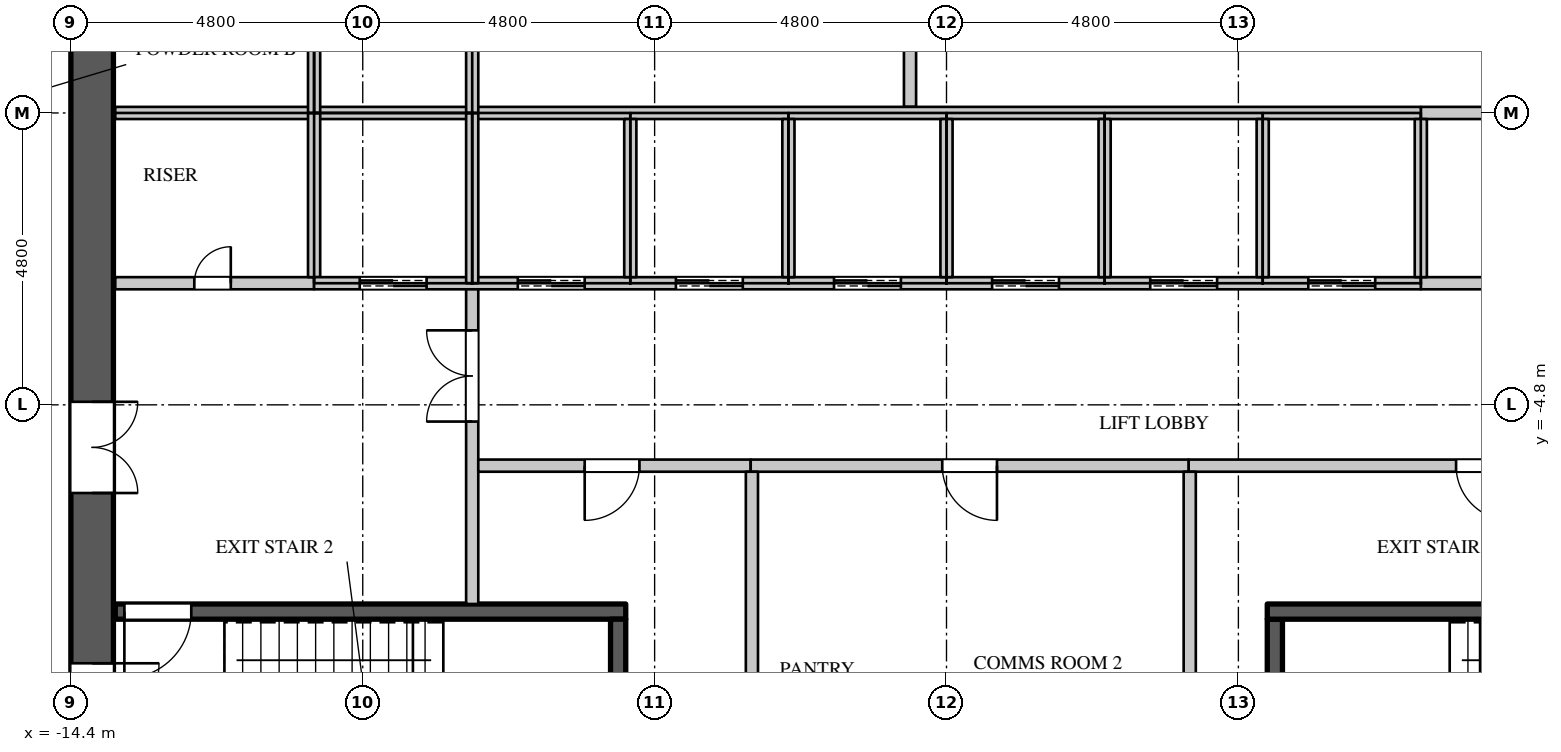
"""IFC4 building model, lengths in metres.
Left out: names, types, materials, properties, quantities, classifications, styles, units other than length and angle.
Written with IfcOpenShell. Run it as: python <this file> out.ifc"""

import sys

from ifc_helpers import new_model, si_unit, direction, frame, frame_2d, origin, place, context, subcontext, project, spatial, rectangle, extrude, element, fill, save


model = new_model("IFC4")
c1 = context("Model", 3, precision=1e-05, world=origin(), true_north=direction((0.0, 1.0)))
c2 = subcontext(c1, "Body", "Model", "MODEL_VIEW")
j1 = project(units=[si_unit("LENGTHUNIT", "METRE"), si_unit("PLANEANGLEUNIT", "RADIAN")], contexts=[c1])
p1 = place(None, origin())
s1 = spatial("IfcSite", under=j1, at=p1, CompositionType="ELEMENT")
p2 = place(p1, origin())
s2 = spatial("IfcBuilding", under=s1, at=p2, CompositionType="ELEMENT")
p3 = place(p2, frame((0.0, 0.0, 200.1)))
s3 = spatial("IfcBuildingStorey", under=s2, at=p3, CompositionType="ELEMENT", Elevation=200.1)
p4 = place(p3, frame((-14.05, -11.3, 0.0), z_axis=(0.0, 0.0, 1.0), x_axis=(0.0, 1.0, 0.0)))
e1 = element("IfcWall", 1, at=p4, inside=s3, PredefinedType="SHEAR", context=c2, shape_type="SweptSolid", body=[
    extrude(rectangle(XDim=22.6, YDim=0.7, at=frame_2d((11.3, 0.0))), origin(), (0.0, 0.0, 1.0), 4.2),
])
p5 = place(p4, frame((20.35, 0.0, 0.0)))
e2 = element("IfcOpeningElement", 2, at=p5, cuts=e1, PredefinedType="OPENING", context=c2, shape_type="SweptSolid", body=[
    extrude(rectangle(XDim=1.1, YDim=2.2, at=frame_2d((0.55, 1.1))), frame((0.0, 0.36, 0.0), z_axis=(0.0, -1.0, 0.0), x_axis=(1.0, 0.0, 0.0)), (0.0, 0.0, 1.0), 0.72),
])
p6 = place(p4, frame((1.15, 0.0, 0.0)))
e3 = element("IfcOpeningElement", 3, at=p6, cuts=e1, PredefinedType="OPENING", context=c2, shape_type="SweptSolid", body=[
    extrude(rectangle(XDim=1.1, YDim=2.2, at=frame_2d((0.55, 1.1))), frame((0.0, 0.36, 0.0), z_axis=(0.0, -1.0, 0.0), x_axis=(1.0, 0.0, 0.0)), (0.0, 0.0, 1.0), 0.72),
])
p7 = place(p4, frame((16.05, 0.0, 0.0)))
e4 = element("IfcOpeningElement", 4, at=p7, cuts=e1, PredefinedType="OPENING", context=c2, shape_type="SweptSolid", body=[
    extrude(rectangle(XDim=1.5, YDim=2.4, at=frame_2d((0.75, 1.2))), frame((0.0, 0.36, 0.0), z_axis=(0.0, -1.0, 0.0), x_axis=(1.0, 0.0, 0.0)), (0.0, 0.0, 1.0), 0.72),
])
p8 = place(p4, frame((5.05, 0.0, 0.0)))
e5 = element("IfcOpeningElement", 5, at=p8, cuts=e1, PredefinedType="OPENING", context=c2, shape_type="SweptSolid", body=[
    extrude(rectangle(XDim=1.5, YDim=2.4, at=frame_2d((0.75, 1.2))), frame((0.0, 0.36, 0.0), z_axis=(0.0, -1.0, 0.0), x_axis=(1.0, 0.0, 0.0)), (0.0, 0.0, 1.0), 0.72),
])
p9 = place(p3, frame((-7.8, -8.075, 0.0), z_axis=(0.0, 0.0, 1.0), x_axis=(0.0, 1.0, 0.0)))
e6 = element("IfcWall", 6, at=p9, inside=s3, PredefinedType="PARTITIONING", context=c2, shape_type="SweptSolid", body=[
    extrude(rectangle(XDim=5.275, YDim=0.2, at=frame_2d((2.637, 0.0))), origin(), (0.0, 0.0, 1.0), 3.798),
])
p10 = place(p9, frame((3.0, 0.0, 0.0)))
e7 = element("IfcOpeningElement", 7, at=p10, cuts=e6, PredefinedType="OPENING", context=c2, shape_type="SweptSolid", body=[
    extrude(rectangle(XDim=1.5, YDim=2.4, at=frame_2d((0.75, 1.2))), frame((0.0, 0.11, 0.0), z_axis=(0.0, -1.0, 0.0), x_axis=(1.0, 0.0, 0.0)), (0.0, 0.0, 1.0), 0.22),
])
p11 = place(p3, frame((-7.7, -5.8, 0.0), z_axis=(0.0, 0.0, 1.0), x_axis=(1.0, 0.0, 0.0)))
e8 = element("IfcWall", 8, at=p11, inside=s3, PredefinedType="PARTITIONING", context=c2, shape_type="SweptSolid", body=[
    extrude(rectangle(XDim=4.48, YDim=0.2, at=frame_2d((2.24, 0.0))), origin(), (0.0, 0.0, 1.0), 3.798),
])
p12 = place(p11, frame((1.75, 0.0, 0.0)))
e9 = element("IfcOpeningElement", 9, at=p12, cuts=e8, PredefinedType="OPENING", context=c2, shape_type="SweptSolid", body=[
    extrude(rectangle(XDim=0.9, YDim=2.2, at=frame_2d((0.45, 1.1))), frame((0.0, 0.11, 0.0), z_axis=(0.0, -1.0, 0.0), x_axis=(1.0, 0.0, 0.0)), (0.0, 0.0, 1.0), 0.22),
])
p13 = place(p3, frame((3.98, -5.8, 0.0), z_axis=(0.0, 0.0, 1.0), x_axis=(1.0, 0.0, 0.0)))
e10 = element("IfcWall", 10, at=p13, inside=s3, PredefinedType="PARTITIONING", context=c2, shape_type="SweptSolid", body=[
    extrude(rectangle(XDim=9.69, YDim=0.2, at=frame_2d((4.845, 0.0))), origin(), (0.0, 0.0, 1.0), 3.798),
])
p14 = place(p13, frame((4.4, 0.0, 0.0)))
e11 = element("IfcOpeningElement", 11, at=p14, cuts=e10, PredefinedType="OPENING", context=c2, shape_type="SweptSolid", body=[
    extrude(rectangle(XDim=0.9, YDim=2.2, at=frame_2d((0.45, 1.1))), frame((0.0, 0.11, 0.0), z_axis=(0.0, -1.0, 0.0), x_axis=(1.0, 0.0, 0.0)), (0.0, 0.0, 1.0), 0.22),
])
p15 = place(p3, frame((-13.67, -2.8, 0.0), z_axis=(0.0, 0.0, 1.0), x_axis=(1.0, 0.0, 0.0)))
e12 = element("IfcWall", 12, at=p15, inside=s3, PredefinedType="PARTITIONING", context=c2, shape_type="SweptSolid", body=[
    extrude(rectangle(XDim=3.27, YDim=0.2, at=frame_2d((1.635, 0.0))), origin(), (0.0, 0.0, 1.0), 3.798),
])
p16 = place(p15, frame((1.3, 0.0, 0.0)))
e13 = element("IfcOpeningElement", 13, at=p16, cuts=e12, PredefinedType="OPENING", context=c2, shape_type="SweptSolid", body=[
    extrude(rectangle(XDim=0.6, YDim=2.0, at=frame_2d((0.3, 1.0))), frame((0.0, 0.11, 0.0), z_axis=(0.0, -1.0, 0.0), x_axis=(1.0, 0.0, 0.0)), (0.0, 0.0, 1.0), 0.22),
])
p17 = place(p3, frame((-3.22, -5.8, 0.0), z_axis=(0.0, 0.0, 1.0), x_axis=(1.0, 0.0, 0.0)))
e14 = element("IfcWall", 14, at=p17, inside=s3, PredefinedType="PARTITIONING", context=c2, shape_type="SweptSolid", body=[
    extrude(rectangle(XDim=7.2, YDim=0.2, at=frame_2d((3.6, 0.0))), origin(), (0.0, 0.0, 1.0), 3.798),
])
p18 = place(p17, frame((3.15, 0.0, 0.0)))
e15 = element("IfcOpeningElement", 15, at=p18, cuts=e14, PredefinedType="OPENING", context=c2, shape_type="SweptSolid", body=[
    extrude(rectangle(XDim=0.9, YDim=2.2, at=frame_2d((0.45, 1.1))), frame((0.0, 0.11, 0.0), z_axis=(0.0, -1.0, 0.0), x_axis=(1.0, 0.0, 0.0)), (0.0, 0.0, 1.0), 0.22),
])
p19 = place(p3, frame((-3.2, -11.27, 0.0), z_axis=(0.0, 0.0, 1.0), x_axis=(0.0, 1.0, 0.0)))
e16 = element("IfcWall", 16, at=p19, inside=s3, PredefinedType="PARTITIONING", context=c2, shape_type="SweptSolid", body=[
    extrude(rectangle(XDim=5.37, YDim=0.2, at=frame_2d((2.685, 0.0))), origin(), (0.0, 0.0, 1.0), 3.798),
])
p20 = place(p3, frame((-0.6, 0.1, 0.0), z_axis=(0.0, 0.0, 1.0), x_axis=(0.0, 1.0, 0.0)))
e17 = element("IfcWall", 17, at=p20, inside=s3, PredefinedType="PARTITIONING", context=c2, shape_type="SweptSolid", body=[
    extrude(rectangle(XDim=2.6, YDim=0.2, at=frame_2d((1.3, 0.0))), origin(), (0.0, 0.0, 1.0), 3.798),
])
p21 = place(p3, frame((4.0, -11.27, 0.0), z_axis=(0.0, 0.0, 1.0), x_axis=(0.0, 1.0, 0.0)))
e18 = element("IfcWall", 18, at=p21, inside=s3, PredefinedType="PARTITIONING", context=c2, shape_type="SweptSolid", body=[
    extrude(rectangle(XDim=5.37, YDim=0.2, at=frame_2d((2.685, 0.0))), origin(), (0.0, 0.0, 1.0), 3.798),
])
p22 = place(p3, frame((7.8, -2.8, 0.0), z_axis=(0.0, 0.0, 1.0), x_axis=(1.0, 0.0, 0.0)))
e19 = element("IfcWall", 19, at=p22, inside=s3, PredefinedType="PARTITIONING", context=c2, shape_type="SweptSolid", body=[
    extrude(rectangle(XDim=5.87, YDim=0.2, at=frame_2d((2.935, 0.0))), origin(), (0.0, 0.0, 1.0), 3.798),
])
p23 = place(p22, frame((2.5, 0.0, 0.0)))
e20 = element("IfcOpeningElement", 20, at=p23, cuts=e19, PredefinedType="OPENING", context=c2, shape_type="SweptSolid", body=[
    extrude(rectangle(XDim=0.9, YDim=2.2, at=frame_2d((0.45, 1.1))), frame((0.0, 0.11, 0.0), z_axis=(0.0, -1.0, 0.0), x_axis=(1.0, 0.0, 0.0)), (0.0, 0.0, 1.0), 0.22),
])
p24 = place(p3, frame((7.8, 0.0, 0.0), z_axis=(0.0, 0.0, 1.0), x_axis=(1.0, 0.0, 0.0)))
e21 = element("IfcWall", 21, at=p24, inside=s3, PredefinedType="PARTITIONING", context=c2, shape_type="SweptSolid", body=[
    extrude(rectangle(XDim=5.87, YDim=0.2, at=frame_2d((2.935, 0.0))), origin(), (0.0, 0.0, 1.0), 3.798),
])
p25 = place(p3, frame((-13.67, 0.0, 0.0), z_axis=(0.0, 0.0, 1.0), x_axis=(1.0, 0.0, 0.0)))
e22 = element("IfcWall", 22, at=p25, inside=s3, PredefinedType="PARTITIONING", context=c2, shape_type="SweptSolid", body=[
    extrude(rectangle(XDim=21.47, YDim=0.2, at=frame_2d((10.735, 0.0))), origin(), (0.0, 0.0, 1.0), 3.798),
])
p26 = place(p3, frame((-10.4, -2.7, 0.0), z_axis=(0.0, 0.0, 1.0), x_axis=(0.0, 1.0, 0.0)))
e23 = element("IfcWall", 23, at=p26, inside=s3, PredefinedType="PARTITIONING", context=c2, shape_type="SweptSolid", body=[
    extrude(rectangle(XDim=2.7, YDim=0.2, at=frame_2d((1.35, 0.0))), origin(), (0.0, 0.0, 1.0), 3.798),
])
p27 = place(p3, frame((-10.4, -2.8, 0.0), z_axis=(0.0, 0.0, 1.0), x_axis=(1.0, 0.0, 0.0)))
e24 = element("IfcWall", 24, at=p27, inside=s3, PredefinedType="PARTITIONING", context=c2, shape_type="SweptSolid", body=[
    extrude(rectangle(XDim=18.2, YDim=0.2, at=frame_2d((9.1, 0.0))), origin(), (0.0, 0.0, 1.0), 3.798),
])
p28 = place(p27, frame((0.75, 0.0, 0.0)))
e25 = element("IfcOpeningElement", 25, at=p28, cuts=e24, PredefinedType="OPENING", context=c2, shape_type="SweptSolid", body=[
    extrude(rectangle(XDim=1.1, YDim=2.2, at=frame_2d((0.55, 1.1))), frame((0.0, 0.11, 0.0), z_axis=(0.0, -1.0, 0.0), x_axis=(1.0, 0.0, 0.0)), (0.0, 0.0, 1.0), 0.22),
])
p29 = place(p27, frame((3.35, 0.0, 0.0)))
e26 = element("IfcOpeningElement", 26, at=p29, cuts=e24, PredefinedType="OPENING", context=c2, shape_type="SweptSolid", body=[
    extrude(rectangle(XDim=1.1, YDim=2.2, at=frame_2d((0.55, 1.1))), frame((0.0, 0.11, 0.0), z_axis=(0.0, -1.0, 0.0), x_axis=(1.0, 0.0, 0.0)), (0.0, 0.0, 1.0), 0.22),
])
p30 = place(p27, frame((5.95, 0.0, 0.0)))
e27 = element("IfcOpeningElement", 27, at=p30, cuts=e24, PredefinedType="OPENING", context=c2, shape_type="SweptSolid", body=[
    extrude(rectangle(XDim=1.1, YDim=2.2, at=frame_2d((0.55, 1.1))), frame((0.0, 0.11, 0.0), z_axis=(0.0, -1.0, 0.0), x_axis=(1.0, 0.0, 0.0)), (0.0, 0.0, 1.0), 0.22),
])
p31 = place(p27, frame((8.55, 0.0, 0.0)))
e28 = element("IfcOpeningElement", 28, at=p31, cuts=e24, PredefinedType="OPENING", context=c2, shape_type="SweptSolid", body=[
    extrude(rectangle(XDim=1.1, YDim=2.2, at=frame_2d((0.55, 1.1))), frame((0.0, 0.11, 0.0), z_axis=(0.0, -1.0, 0.0), x_axis=(1.0, 0.0, 0.0)), (0.0, 0.0, 1.0), 0.22),
])
p32 = place(p27, frame((11.15, 0.0, 0.0)))
e29 = element("IfcOpeningElement", 29, at=p32, cuts=e24, PredefinedType="OPENING", context=c2, shape_type="SweptSolid", body=[
    extrude(rectangle(XDim=1.1, YDim=2.2, at=frame_2d((0.55, 1.1))), frame((0.0, 0.11, 0.0), z_axis=(0.0, -1.0, 0.0), x_axis=(1.0, 0.0, 0.0)), (0.0, 0.0, 1.0), 0.22),
])
p33 = place(p27, frame((13.75, 0.0, 0.0)))
e30 = element("IfcOpeningElement", 30, at=p33, cuts=e24, PredefinedType="OPENING", context=c2, shape_type="SweptSolid", body=[
    extrude(rectangle(XDim=1.1, YDim=2.2, at=frame_2d((0.55, 1.1))), frame((0.0, 0.11, 0.0), z_axis=(0.0, -1.0, 0.0), x_axis=(1.0, 0.0, 0.0)), (0.0, 0.0, 1.0), 0.22),
])
p34 = place(p27, frame((16.35, 0.0, 0.0)))
e31 = element("IfcOpeningElement", 31, at=p34, cuts=e24, PredefinedType="OPENING", context=c2, shape_type="SweptSolid", body=[
    extrude(rectangle(XDim=1.1, YDim=2.2, at=frame_2d((0.55, 1.1))), frame((0.0, 0.11, 0.0), z_axis=(0.0, -1.0, 0.0), x_axis=(1.0, 0.0, 0.0)), (0.0, 0.0, 1.0), 0.22),
])
p35 = place(p3, frame((-10.4, 0.0, 0.0), z_axis=(0.0, 0.0, 1.0), x_axis=(0.0, 1.0, 0.0)))
e32 = element("IfcWall", 32, at=p35, inside=s3, PredefinedType="PARTITIONING", context=c2, shape_type="SweptSolid", body=[
    extrude(rectangle(XDim=2.7, YDim=0.2, at=frame_2d((1.35, 0.0))), origin(), (0.0, 0.0, 1.0), 3.798),
])
for number, where, z_axis, x_axis in (
    (33, (-7.8, -2.8, 0.0), (0.0, 0.0, 1.0), (0.0, 1.0, 0.0)),
    (34, (-7.8, 0.0, 0.0), (0.0, 0.0, 1.0), (0.0, 1.0, 0.0)),
):
    element("IfcWall", number, at=place(p3, frame(where, z_axis=z_axis, x_axis=x_axis)), inside=s3, PredefinedType="PARTITIONING", context=c2, shape_type="SweptSolid", body=[
        extrude(rectangle(XDim=2.8, YDim=0.2, at=frame_2d((1.4, 0.0))), origin(), (0.0, 0.0, 1.0), 3.798),
    ])
for number, where, z_axis, x_axis in (
    (35, (-5.2, -2.7, 0.0), (0.0, 0.0, 1.0), (0.0, 1.0, 0.0)),
    (36, (-2.6, -2.7, 0.0), (0.0, 0.0, 1.0), (0.0, 1.0, 0.0)),
    (37, (0.0, -2.7, 0.0), (0.0, 0.0, 1.0), (0.0, 1.0, 0.0)),
    (38, (2.6, -2.7, 0.0), (0.0, 0.0, 1.0), (0.0, 1.0, 0.0)),
    (39, (5.2, -2.7, 0.0), (0.0, 0.0, 1.0), (0.0, 1.0, 0.0)),
    (40, (7.8, -2.7, 0.0), (0.0, 0.0, 1.0), (0.0, 1.0, 0.0)),
):
    element("IfcWall", number, at=place(p3, frame(where, z_axis=z_axis, x_axis=x_axis)), inside=s3, PredefinedType="PARTITIONING", context=c2, shape_type="SweptSolid", body=[
        extrude(rectangle(XDim=2.6, YDim=0.2, at=frame_2d((1.3, 0.0))), origin(), (0.0, 0.0, 1.0), 3.798),
    ])
p36 = place(p3, frame((-13.67, -8.2, 0.0), z_axis=(0.0, 0.0, 1.0), x_axis=(1.0, 0.0, 0.0)))
e41 = element("IfcWall", 41, at=p36, inside=s3, PredefinedType="SHEAR", context=c2, shape_type="SweptSolid", body=[
    extrude(rectangle(XDim=8.395, YDim=0.25, at=frame_2d((4.198, 0.0))), origin(), (0.0, 0.0, 1.0), 3.798),
])
p37 = place(p36, frame((0.15, 0.0, 0.0)))
e42 = element("IfcOpeningElement", 42, at=p37, cuts=e41, PredefinedType="OPENING", context=c2, shape_type="SweptSolid", body=[
    extrude(rectangle(XDim=1.1, YDim=2.2, at=frame_2d((0.55, 1.1))), frame((0.0, 0.135, 0.0), z_axis=(0.0, -1.0, 0.0), x_axis=(1.0, 0.0, 0.0)), (0.0, 0.0, 1.0), 0.27),
])
for number, where, z_axis, x_axis in (
    (43, (-5.4, -11.27, 0.0), (0.0, 0.0, 1.0), (0.0, 1.0, 0.0)),
    (44, (5.4, -11.27, 0.0), (0.0, 0.0, 1.0), (0.0, 1.0, 0.0)),
):
    element("IfcWall", number, at=place(p3, frame(where, z_axis=z_axis, x_axis=x_axis)), inside=s3, PredefinedType="SHEAR", context=c2, shape_type="SweptSolid", body=[
        extrude(rectangle(XDim=2.945, YDim=0.25, at=frame_2d((1.473, 0.0))), origin(), (0.0, 0.0, 1.0), 3.798),
    ])
p38 = place(p3, frame((5.275, -8.2, 0.0), z_axis=(0.0, 0.0, 1.0), x_axis=(1.0, 0.0, 0.0)))
e45 = element("IfcWall", 45, at=p38, inside=s3, PredefinedType="SHEAR", context=c2, shape_type="SweptSolid", body=[
    extrude(rectangle(XDim=8.395, YDim=0.25, at=frame_2d((4.198, 0.0))), origin(), (0.0, 0.0, 1.0), 3.798),
])
p39 = place(p16, origin())
e46 = element("IfcDoor", 46, at=p39, inside=s3, OperationType="SINGLE_SWING_RIGHT", PredefinedType="DOOR", context=c2, shape_type="SweptSolid", body=[
    extrude(rectangle(XDim=0.6, YDim=2.0, at=frame_2d((0.3, 1.0))), frame((0.0, 0.025, 0.0), z_axis=(0.0, -1.0, 0.0), x_axis=(1.0, 0.0, 0.0)), (0.0, 0.0, 1.0), 0.05),
])
fill(e13, e46)
p40 = place(p12, origin())
e47 = element("IfcDoor", 47, at=p40, inside=s3, OperationType="SINGLE_SWING_RIGHT", PredefinedType="DOOR", context=c2, shape_type="SweptSolid", body=[
    extrude(rectangle(XDim=0.9, YDim=2.2, at=frame_2d((0.45, 1.1))), frame((0.0, 0.025, 0.0), z_axis=(0.0, -1.0, 0.0), x_axis=(1.0, 0.0, 0.0)), (0.0, 0.0, 1.0), 0.05),
])
fill(e9, e47)
p41 = place(p18, origin())
e48 = element("IfcDoor", 48, at=p41, inside=s3, OperationType="SINGLE_SWING_LEFT", PredefinedType="DOOR", context=c2, shape_type="SweptSolid", body=[
    extrude(rectangle(XDim=0.9, YDim=2.2, at=frame_2d((0.45, 1.1))), frame((0.0, 0.025, 0.0), z_axis=(0.0, -1.0, 0.0), x_axis=(1.0, 0.0, 0.0)), (0.0, 0.0, 1.0), 0.05),
])
fill(e15, e48)
p42 = place(p14, origin())
e49 = element("IfcDoor", 49, at=p42, inside=s3, OperationType="SINGLE_SWING_LEFT", PredefinedType="DOOR", context=c2, shape_type="SweptSolid", body=[
    extrude(rectangle(XDim=0.9, YDim=2.2, at=frame_2d((0.45, 1.1))), frame((0.0, 0.025, 0.0), z_axis=(0.0, -1.0, 0.0), x_axis=(1.0, 0.0, 0.0)), (0.0, 0.0, 1.0), 0.05),
])
fill(e11, e49)
p43 = place(p28, origin())
e50 = element("IfcDoor", 50, at=p43, inside=s3, OperationType="DOUBLE_DOOR_SLIDING", PredefinedType="DOOR", context=c2, shape_type="SweptSolid", body=[
    extrude(rectangle(XDim=1.1, YDim=2.2, at=frame_2d((0.55, 1.1))), frame((0.0, 0.025, 0.0), z_axis=(0.0, -1.0, 0.0), x_axis=(1.0, 0.0, 0.0)), (0.0, 0.0, 1.0), 0.05),
])
fill(e25, e50)
p44 = place(p29, origin())
e51 = element("IfcDoor", 51, at=p44, inside=s3, OperationType="DOUBLE_DOOR_SLIDING", PredefinedType="DOOR", context=c2, shape_type="SweptSolid", body=[
    extrude(rectangle(XDim=1.1, YDim=2.2, at=frame_2d((0.55, 1.1))), frame((0.0, 0.025, 0.0), z_axis=(0.0, -1.0, 0.0), x_axis=(1.0, 0.0, 0.0)), (0.0, 0.0, 1.0), 0.05),
])
fill(e26, e51)
p45 = place(p30, origin())
e52 = element("IfcDoor", 52, at=p45, inside=s3, OperationType="DOUBLE_DOOR_SLIDING", PredefinedType="DOOR", context=c2, shape_type="SweptSolid", body=[
    extrude(rectangle(XDim=1.1, YDim=2.2, at=frame_2d((0.55, 1.1))), frame((0.0, 0.025, 0.0), z_axis=(0.0, -1.0, 0.0), x_axis=(1.0, 0.0, 0.0)), (0.0, 0.0, 1.0), 0.05),
])
fill(e27, e52)
p46 = place(p31, origin())
e53 = element("IfcDoor", 53, at=p46, inside=s3, OperationType="DOUBLE_DOOR_SLIDING", PredefinedType="DOOR", context=c2, shape_type="SweptSolid", body=[
    extrude(rectangle(XDim=1.1, YDim=2.2, at=frame_2d((0.55, 1.1))), frame((0.0, 0.025, 0.0), z_axis=(0.0, -1.0, 0.0), x_axis=(1.0, 0.0, 0.0)), (0.0, 0.0, 1.0), 0.05),
])
fill(e28, e53)
p47 = place(p32, origin())
e54 = element("IfcDoor", 54, at=p47, inside=s3, OperationType="DOUBLE_DOOR_SLIDING", PredefinedType="DOOR", context=c2, shape_type="SweptSolid", body=[
    extrude(rectangle(XDim=1.1, YDim=2.2, at=frame_2d((0.55, 1.1))), frame((0.0, 0.025, 0.0), z_axis=(0.0, -1.0, 0.0), x_axis=(1.0, 0.0, 0.0)), (0.0, 0.0, 1.0), 0.05),
])
fill(e29, e54)
p48 = place(p33, origin())
e55 = element("IfcDoor", 55, at=p48, inside=s3, OperationType="DOUBLE_DOOR_SLIDING", PredefinedType="DOOR", context=c2, shape_type="SweptSolid", body=[
    extrude(rectangle(XDim=1.1, YDim=2.2, at=frame_2d((0.55, 1.1))), frame((0.0, 0.025, 0.0), z_axis=(0.0, -1.0, 0.0), x_axis=(1.0, 0.0, 0.0)), (0.0, 0.0, 1.0), 0.05),
])
fill(e30, e55)
p49 = place(p34, origin())
e56 = element("IfcDoor", 56, at=p49, inside=s3, OperationType="DOUBLE_DOOR_SLIDING", PredefinedType="DOOR", context=c2, shape_type="SweptSolid", body=[
    extrude(rectangle(XDim=1.1, YDim=2.2, at=frame_2d((0.55, 1.1))), frame((0.0, 0.025, 0.0), z_axis=(0.0, -1.0, 0.0), x_axis=(1.0, 0.0, 0.0)), (0.0, 0.0, 1.0), 0.05),
])
fill(e31, e56)
p50 = place(p37, origin())
e57 = element("IfcDoor", 57, at=p50, inside=s3, OperationType="SINGLE_SWING_RIGHT", PredefinedType="DOOR", context=c2, shape_type="SweptSolid", body=[
    extrude(rectangle(XDim=1.1, YDim=2.2, at=frame_2d((0.55, 1.1))), frame((0.0, 0.025, 0.0), z_axis=(0.0, -1.0, 0.0), x_axis=(1.0, 0.0, 0.0)), (0.0, 0.0, 1.0), 0.05),
])
fill(e42, e57)
p51 = place(p10, origin())
e58 = element("IfcDoor", 58, at=p51, inside=s3, OperationType="DOUBLE_DOOR_SINGLE_SWING", PredefinedType="DOOR", context=c2, shape_type="SweptSolid", body=[
    extrude(rectangle(XDim=1.5, YDim=2.4, at=frame_2d((0.75, 1.2))), frame((0.0, 0.025, 0.0), z_axis=(0.0, -1.0, 0.0), x_axis=(1.0, 0.0, 0.0)), (0.0, 0.0, 1.0), 0.05),
])
fill(e7, e58)
p52 = place(p6, origin())
e59 = element("IfcDoor", 59, at=p52, inside=s3, OperationType="SINGLE_SWING_LEFT", PredefinedType="DOOR", context=c2, shape_type="SweptSolid", body=[
    extrude(rectangle(XDim=1.1, YDim=2.2, at=frame_2d((0.55, 1.1))), frame((0.0, -0.295, 0.0), z_axis=(0.0, -1.0, 0.0), x_axis=(1.0, 0.0, 0.0)), (0.0, 0.0, 1.0), 0.05),
])
fill(e3, e59)
p53 = place(p8, origin())
e60 = element("IfcDoor", 60, at=p53, inside=s3, OperationType="DOUBLE_DOOR_SINGLE_SWING", PredefinedType="DOOR", context=c2, shape_type="SweptSolid", body=[
    extrude(rectangle(XDim=1.5, YDim=2.4, at=frame_2d((0.75, 1.2))), frame((0.0, -0.295, 0.0), z_axis=(0.0, -1.0, 0.0), x_axis=(1.0, 0.0, 0.0)), (0.0, 0.0, 1.0), 0.05),
])
fill(e5, e60)
save(model, sys.argv[1])
